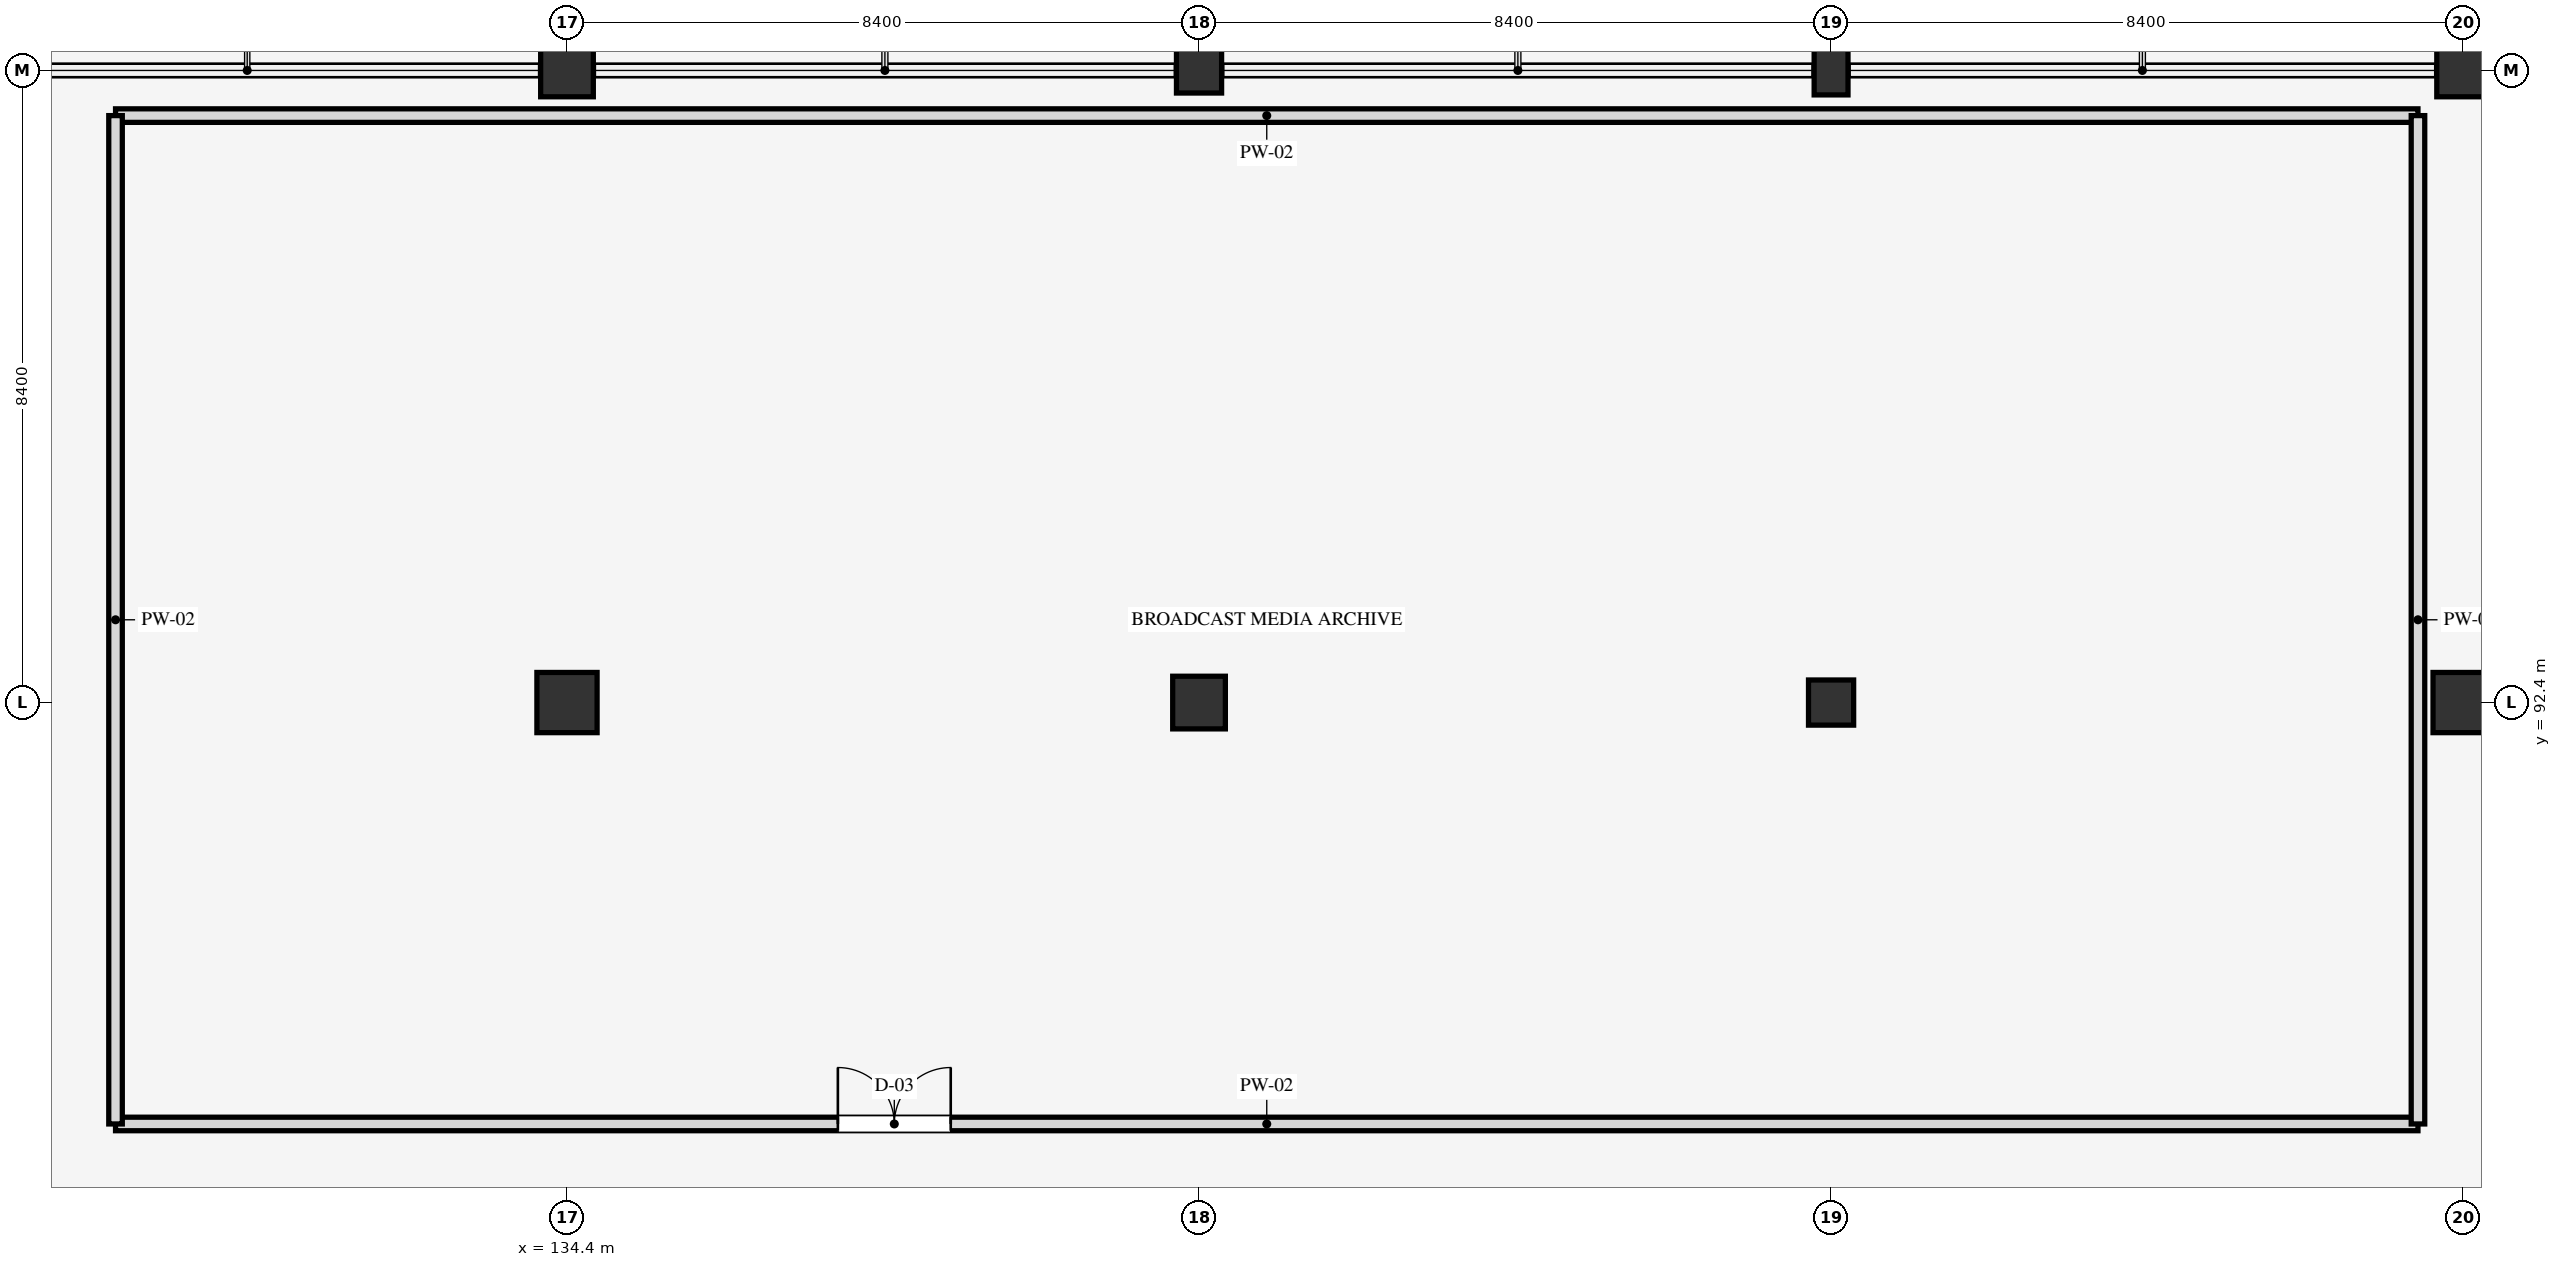
"""IFC4 building model, lengths in metres.
Left out: names, types, materials, properties, quantities, classifications, styles, units other than length and angle.
Written with IfcOpenShell. Run it as: python <this file> out.ifc"""

import sys

from ifc_helpers import new_model, si_unit, direction, frame, frame_2d, origin, origin_2d, place, context, subcontext, project, spatial, rectangle, extrude, element, fill, save


model = new_model("IFC4")
c1 = context("Model", 3, precision=1e-05, world=origin(), true_north=direction((0.0, 1.0)))
c2 = subcontext(c1, "Body", "Model", "MODEL_VIEW")
j1 = project(units=[si_unit("LENGTHUNIT", "METRE"), si_unit("PLANEANGLEUNIT", "RADIAN")], contexts=[c1])
p1 = place(None, origin())
s1 = spatial("IfcSite", under=j1, at=p1, CompositionType="ELEMENT")
p2 = place(p1, origin())
s2 = spatial("IfcBuilding", under=s1, at=p2, CompositionType="ELEMENT")
p3 = place(p2, frame((0.0, 0.0, 9.9)))
s3 = spatial("IfcBuildingStorey", under=s2, at=p3, CompositionType="ELEMENT", Elevation=9.9)
p4 = place(p3, frame((134.4, 92.4, 0.0), z_axis=(0.0, 0.0, 1.0), x_axis=(1.0, 0.0, 0.0)))
e1 = element("IfcColumn", 1, at=p4, inside=s3, PredefinedType="COLUMN", context=c2, shape_type="SweptSolid", body=[
    extrude(rectangle(XDim=0.8, YDim=0.8, at=origin_2d()), origin(), (0.0, 0.0, 1.0), 4.5),
])
for number, where, z_axis, x_axis in (
    (2, (134.4, 100.8, 0.0), (0.0, 0.0, 1.0), (1.0, 0.0, 0.0)),
    (3, (142.8, 92.4, 0.0), (0.0, 0.0, 1.0), (1.0, 0.0, 0.0)),
):
    element("IfcColumn", number, at=place(p3, frame(where, z_axis=z_axis, x_axis=x_axis)), inside=s3, PredefinedType="COLUMN", context=c2, shape_type="SweptSolid", body=[
        extrude(rectangle(XDim=0.7, YDim=0.7, at=origin_2d()), origin(), (0.0, 0.0, 1.0), 4.5),
    ])
for number, where, z_axis, x_axis in (
    (4, (142.8, 100.8, 0.0), (0.0, 0.0, 1.0), (1.0, 0.0, 0.0)),
    (5, (151.2, 92.4, 0.0), (0.0, 0.0, 1.0), (1.0, 0.0, 0.0)),
):
    element("IfcColumn", number, at=place(p3, frame(where, z_axis=z_axis, x_axis=x_axis)), inside=s3, PredefinedType="COLUMN", context=c2, shape_type="SweptSolid", body=[
        extrude(rectangle(XDim=0.6, YDim=0.6, at=origin_2d()), origin(), (0.0, 0.0, 1.0), 4.5),
    ])
p5 = place(p3, frame((151.2, 100.8, 0.0), z_axis=(0.0, 0.0, 1.0), x_axis=(1.0, 0.0, 0.0)))
e6 = element("IfcColumn", 6, at=p5, inside=s3, PredefinedType="PILASTER", context=c2, shape_type="SweptSolid", body=[
    extrude(rectangle(XDim=0.45, YDim=0.65, at=origin_2d()), origin(), (0.0, 0.0, 1.0), 4.5),
])
p6 = place(p3, frame((159.6, 92.4, 0.0), z_axis=(0.0, 0.0, 1.0), x_axis=(1.0, 0.0, 0.0)))
e7 = element("IfcColumn", 7, at=p6, inside=s3, PredefinedType="COLUMN", context=c2, shape_type="SweptSolid", body=[
    extrude(rectangle(XDim=0.8, YDim=0.8, at=origin_2d()), origin(), (0.0, 0.0, 1.0), 4.5),
])
p7 = place(p3, frame((159.6, 100.8, 0.0), z_axis=(0.0, 0.0, 1.0), x_axis=(1.0, 0.0, 0.0)))
e8 = element("IfcColumn", 8, at=p7, inside=s3, PredefinedType="COLUMN", context=c2, shape_type="SweptSolid", body=[
    extrude(rectangle(XDim=0.7, YDim=0.7, at=origin_2d()), origin(), (0.0, 0.0, 1.0), 4.5),
])
p8 = place(p3, frame((128.4, 86.8, 0.0), z_axis=(0.0, 0.0, 1.0), x_axis=(1.0, 0.0, 0.0)))
e9 = element("IfcWall", 9, at=p8, inside=s3, PredefinedType="PARTITIONING", context=c2, shape_type="SweptSolid", body=[
    extrude(rectangle(XDim=30.6, YDim=0.18, at=frame_2d((15.3, 0.0))), origin(), (0.0, 0.0, 1.0), 3.54),
])
p9 = place(p8, frame((9.6, 0.0, 0.0)))
e10 = element("IfcOpeningElement", 10, at=p9, cuts=e9, PredefinedType="OPENING", context=c2, shape_type="SweptSolid", body=[
    extrude(rectangle(XDim=1.5, YDim=2.2, at=frame_2d((0.75, 1.1))), frame((0.0, 0.1, 0.0), z_axis=(0.0, -1.0, 0.0), x_axis=(1.0, 0.0, 0.0)), (0.0, 0.0, 1.0), 0.2),
])
p10 = place(p3, frame((128.4, 100.2, 0.0), z_axis=(0.0, 0.0, 1.0), x_axis=(1.0, 0.0, 0.0)))
e11 = element("IfcWall", 11, at=p10, inside=s3, PredefinedType="PARTITIONING", context=c2, shape_type="SweptSolid", body=[
    extrude(rectangle(XDim=30.6, YDim=0.18, at=frame_2d((15.3, 0.0))), origin(), (0.0, 0.0, 1.0), 3.54),
])
for number, where, z_axis, x_axis in (
    (12, (128.4, 86.8, 0.0), (0.0, 0.0, 1.0), (0.0, 1.0, 0.0)),
    (13, (159.0, 86.8, 0.0), (0.0, 0.0, 1.0), (0.0, 1.0, 0.0)),
):
    element("IfcWall", number, at=place(p3, frame(where, z_axis=z_axis, x_axis=x_axis)), inside=s3, PredefinedType="PARTITIONING", context=c2, shape_type="SweptSolid", body=[
        extrude(rectangle(XDim=13.4, YDim=0.18, at=frame_2d((6.7, 0.0))), origin(), (0.0, 0.0, 1.0), 3.54),
    ])
p11 = place(p9, origin())
e14 = element("IfcDoor", 14, at=p11, inside=s3, OperationType="DOUBLE_DOOR_SINGLE_SWING", PredefinedType="DOOR", context=c2, shape_type="SweptSolid", body=[
    extrude(rectangle(XDim=1.5, YDim=2.2, at=frame_2d((0.75, 1.1))), frame((0.0, 0.025, 0.0), z_axis=(0.0, -1.0, 0.0), x_axis=(1.0, 0.0, 0.0)), (0.0, 0.0, 1.0), 0.05),
])
fill(e10, e14)
save(model, sys.argv[1])
